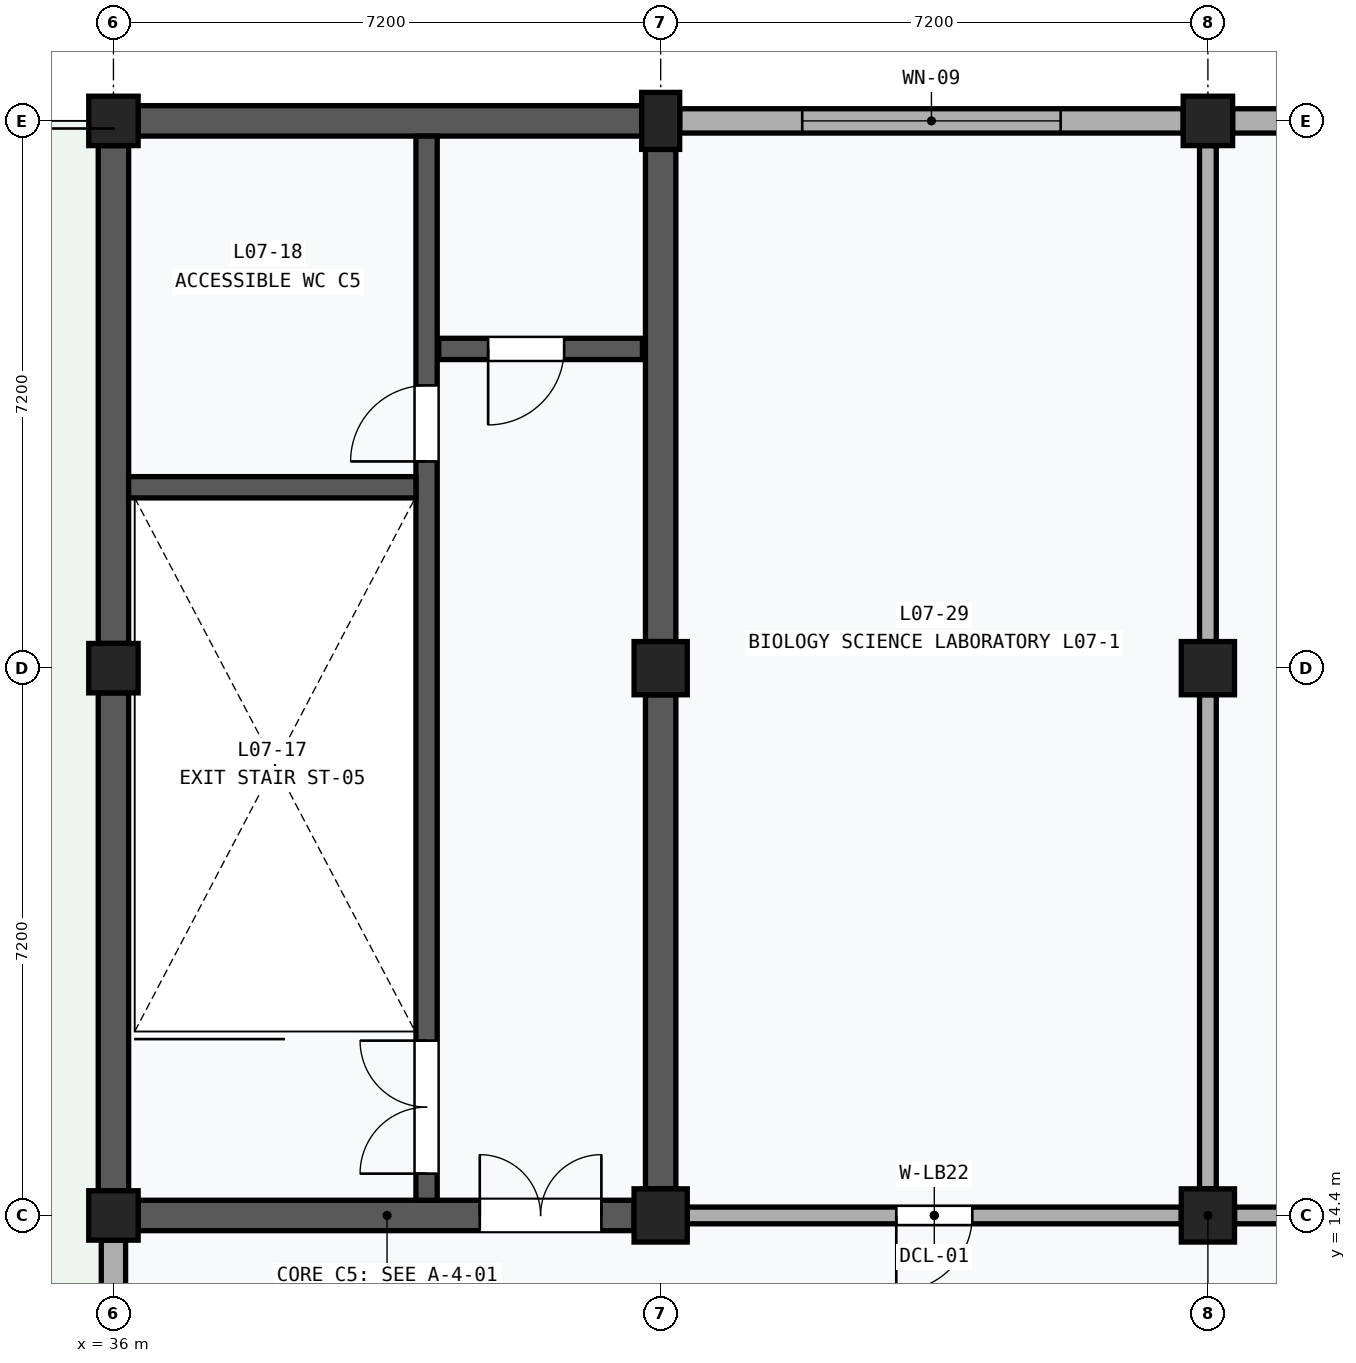
"""IFC4 building model, lengths in metres.
Left out: names, types, materials, properties, quantities, classifications, styles, units other than length and angle.
Written with IfcOpenShell. Run it as: python <this file> out.ifc"""

import sys

from ifc_helpers import new_model, si_unit, direction, frame, frame_2d, origin, origin_2d, place, context, subcontext, project, spatial, rectangle, extrude, element, fill, save


model = new_model("IFC4")
c1 = context("Model", 3, precision=1e-05, world=origin(), true_north=direction((0.0, 1.0)))
c2 = subcontext(c1, "Body", "Model", "MODEL_VIEW")
j1 = project(units=[si_unit("LENGTHUNIT", "METRE"), si_unit("PLANEANGLEUNIT", "RADIAN")], contexts=[c1])
p1 = place(None, origin())
s1 = spatial("IfcSite", under=j1, at=p1, CompositionType="ELEMENT")
p2 = place(p1, origin())
s2 = spatial("IfcBuilding", under=s1, at=p2, CompositionType="ELEMENT")
p3 = place(p2, frame((0.0, 0.0, 30.6)))
s3 = spatial("IfcBuildingStorey", under=s2, at=p3, CompositionType="ELEMENT", Elevation=30.6)
for number, where, z_axis, x_axis in (
    (1, (36.0, 14.4, 0.0), (0.0, 0.0, 1.0), (1.0, 0.0, 0.0)),
    (2, (36.0, 21.6, 0.0), (0.0, 0.0, 1.0), (1.0, 0.0, 0.0)),
    (3, (36.0, 28.8, 0.0), (0.0, 0.0, 1.0), (1.0, 0.0, 0.0)),
):
    element("IfcColumn", number, at=place(p3, frame(where, z_axis=z_axis, x_axis=x_axis)), inside=s3, PredefinedType="COLUMN", context=c2, shape_type="SweptSolid", body=[
        extrude(rectangle(XDim=0.65, YDim=0.65, at=origin_2d()), origin(), (0.0, 0.0, 1.0), 4.2),
    ])
for number, where, z_axis, x_axis in (
    (4, (43.2, 14.4, 0.0), (0.0, 0.0, 1.0), (1.0, 0.0, 0.0)),
    (5, (43.2, 21.6, 0.0), (0.0, 0.0, 1.0), (1.0, 0.0, 0.0)),
):
    element("IfcColumn", number, at=place(p3, frame(where, z_axis=z_axis, x_axis=x_axis)), inside=s3, PredefinedType="COLUMN", context=c2, shape_type="SweptSolid", body=[
        extrude(rectangle(XDim=0.7, YDim=0.7, at=origin_2d()), origin(), (0.0, 0.0, 1.0), 4.2),
    ])
p4 = place(p3, frame((43.2, 28.8, 0.0), z_axis=(0.0, 0.0, 1.0), x_axis=(1.0, 0.0, 0.0)))
e6 = element("IfcColumn", 6, at=p4, inside=s3, PredefinedType="PILASTER", context=c2, shape_type="SweptSolid", body=[
    extrude(rectangle(XDim=0.5, YDim=0.75, at=origin_2d()), origin(), (0.0, 0.0, 1.0), 4.2),
])
for number, where, z_axis, x_axis in (
    (7, (50.4, 14.4, 0.0), (0.0, 0.0, 1.0), (1.0, 0.0, 0.0)),
    (8, (50.4, 21.6, 0.0), (0.0, 0.0, 1.0), (1.0, 0.0, 0.0)),
):
    element("IfcColumn", number, at=place(p3, frame(where, z_axis=z_axis, x_axis=x_axis)), inside=s3, PredefinedType="COLUMN", context=c2, shape_type="SweptSolid", body=[
        extrude(rectangle(XDim=0.7, YDim=0.7, at=origin_2d()), origin(), (0.0, 0.0, 1.0), 4.2),
    ])
p5 = place(p3, frame((50.4, 28.8, 0.0), z_axis=(0.0, 0.0, 1.0), x_axis=(1.0, 0.0, 0.0)))
e9 = element("IfcColumn", 9, at=p5, inside=s3, PredefinedType="COLUMN", context=c2, shape_type="SweptSolid", body=[
    extrude(rectangle(XDim=0.65, YDim=0.65, at=origin_2d()), origin(), (0.0, 0.0, 1.0), 4.2),
])
p6 = place(p3, frame((36.0, 7.525, 0.0), z_axis=(0.0, 0.0, 1.0), x_axis=(0.0, 1.0, 0.0)))
e10 = element("IfcWall", 10, at=p6, inside=s3, PredefinedType="SOLIDWALL", context=c2, shape_type="SweptSolid", body=[
    extrude(rectangle(XDim=6.55, YDim=0.32, at=frame_2d((3.275, 0.0))), origin(), (0.0, 0.0, 1.0), 3.25),
])
p7 = place(p6, frame((2.525, 0.0, 0.0)))
e11 = element("IfcOpeningElement", 11, at=p7, cuts=e10, PredefinedType="OPENING", context=c2, shape_type="SweptSolid", body=[
    extrude(rectangle(XDim=1.5, YDim=2.15, at=frame_2d((0.75, 1.075))), frame((0.0, 0.172, 0.0), z_axis=(0.0, -1.0, 0.0), x_axis=(1.0, 0.0, 0.0)), (0.0, 0.0, 1.0), 0.344),
])
p8 = place(p3, frame((43.45, 28.8, 0.0), z_axis=(0.0, 0.0, 1.0), x_axis=(1.0, 0.0, 0.0)))
e12 = element("IfcWall", 12, at=p8, inside=s3, PredefinedType="SOLIDWALL", context=c2, shape_type="SweptSolid", body=[
    extrude(rectangle(XDim=6.625, YDim=0.32, at=frame_2d((3.312, 0.0))), origin(), (0.0, 0.0, 1.0), 3.25),
])
p9 = place(p8, frame((1.613, 0.0, 0.9)))
e13 = element("IfcOpeningElement", 13, at=p9, cuts=e12, PredefinedType="OPENING", context=c2, shape_type="SweptSolid", body=[
    extrude(rectangle(XDim=3.4, YDim=1.8, at=frame_2d((1.7, 0.9))), frame((0.0, 0.172, 0.0), z_axis=(0.0, -1.0, 0.0), x_axis=(1.0, 0.0, 0.0)), (0.0, 0.0, 1.0), 0.344),
])
p10 = place(p3, frame((50.725, 28.8, 0.0), z_axis=(0.0, 0.0, 1.0), x_axis=(1.0, 0.0, 0.0)))
e14 = element("IfcWall", 14, at=p10, inside=s3, PredefinedType="SOLIDWALL", context=c2, shape_type="SweptSolid", body=[
    extrude(rectangle(XDim=6.55, YDim=0.32, at=frame_2d((3.275, 0.0))), origin(), (0.0, 0.0, 1.0), 3.25),
])
p11 = place(p10, frame((2.375, 0.0, 0.85)))
e15 = element("IfcOpeningElement", 15, at=p11, cuts=e14, PredefinedType="OPENING", context=c2, shape_type="SweptSolid", body=[
    extrude(rectangle(XDim=1.8, YDim=2.0, at=frame_2d((0.9, 1.0))), frame((0.0, 0.172, 0.0), z_axis=(0.0, -1.0, 0.0), x_axis=(1.0, 0.0, 0.0)), (0.0, 0.0, 1.0), 0.344),
])
p12 = place(p3, frame((36.0, 14.725, 0.0), z_axis=(0.0, 0.0, 1.0), x_axis=(0.0, 1.0, 0.0)))
e16 = element("IfcWall", 16, at=p12, inside=s3, PredefinedType="SHEAR", context=c2, shape_type="SweptSolid", body=[
    extrude(rectangle(XDim=6.55, YDim=0.4, at=frame_2d((3.275, 0.0))), origin(), (0.0, 0.0, 1.0), 3.25),
])
p13 = place(p3, frame((36.0, 21.925, 0.0), z_axis=(0.0, 0.0, 1.0), x_axis=(0.0, 1.0, 0.0)))
e17 = element("IfcWall", 17, at=p13, inside=s3, PredefinedType="SHEAR", context=c2, shape_type="SweptSolid", body=[
    extrude(rectangle(XDim=6.55, YDim=0.4, at=frame_2d((3.275, 0.0))), origin(), (0.0, 0.0, 1.0), 3.25),
])
p14 = place(p3, frame((43.2, 14.75, 0.0), z_axis=(0.0, 0.0, 1.0), x_axis=(0.0, 1.0, 0.0)))
e18 = element("IfcWall", 18, at=p14, inside=s3, PredefinedType="SHEAR", context=c2, shape_type="SweptSolid", body=[
    extrude(rectangle(XDim=6.5, YDim=0.4, at=frame_2d((3.25, 0.0))), origin(), (0.0, 0.0, 1.0), 3.11),
])
p15 = place(p3, frame((43.2, 21.95, 0.0), z_axis=(0.0, 0.0, 1.0), x_axis=(0.0, 1.0, 0.0)))
e19 = element("IfcWall", 19, at=p15, inside=s3, PredefinedType="SHEAR", context=c2, shape_type="SweptSolid", body=[
    extrude(rectangle(XDim=6.475, YDim=0.4, at=frame_2d((3.238, 0.0))), origin(), (0.0, 0.0, 1.0), 3.11),
])
p16 = place(p3, frame((36.325, 14.4, 0.0), z_axis=(0.0, 0.0, 1.0), x_axis=(1.0, 0.0, 0.0)))
e20 = element("IfcWall", 20, at=p16, inside=s3, PredefinedType="SHEAR", context=c2, shape_type="SweptSolid", body=[
    extrude(rectangle(XDim=6.525, YDim=0.4, at=frame_2d((3.263, 0.0))), origin(), (0.0, 0.0, 1.0), 3.11),
])
p17 = place(p16, frame((4.495, 0.0, 0.0)))
e21 = element("IfcOpeningElement", 21, at=p17, cuts=e20, PredefinedType="OPENING", context=c2, shape_type="SweptSolid", body=[
    extrude(rectangle(XDim=1.6, YDim=2.2, at=frame_2d((0.8, 1.1))), frame((0.0, 0.212, 0.0), z_axis=(0.0, -1.0, 0.0), x_axis=(1.0, 0.0, 0.0)), (0.0, 0.0, 1.0), 0.424),
])
p18 = place(p3, frame((36.325, 28.8, 0.0), z_axis=(0.0, 0.0, 1.0), x_axis=(1.0, 0.0, 0.0)))
e22 = element("IfcWall", 22, at=p18, inside=s3, PredefinedType="SHEAR", context=c2, shape_type="SweptSolid", body=[
    extrude(rectangle(XDim=6.625, YDim=0.4, at=frame_2d((3.312, 0.0))), origin(), (0.0, 0.0, 1.0), 3.25),
])
p19 = place(p3, frame((40.12, 14.6, 0.0), z_axis=(0.0, 0.0, 1.0), x_axis=(0.0, 1.0, 0.0)))
e23 = element("IfcWall", 23, at=p19, inside=s3, PredefinedType="SHEAR", context=c2, shape_type="SweptSolid", body=[
    extrude(rectangle(XDim=14.0, YDim=0.28, at=frame_2d((7.0, 0.0))), origin(), (0.0, 0.0, 1.0), 3.88),
])
p20 = place(p19, frame((0.35, 0.0, 0.0)))
e24 = element("IfcOpeningElement", 24, at=p20, cuts=e23, PredefinedType="OPENING", context=c2, shape_type="SweptSolid", body=[
    extrude(rectangle(XDim=1.75, YDim=2.15, at=frame_2d((0.875, 1.075))), frame((0.0, 0.152, 0.0), z_axis=(0.0, -1.0, 0.0), x_axis=(1.0, 0.0, 0.0)), (0.0, 0.0, 1.0), 0.304),
])
p21 = place(p19, frame((9.72, 0.0, 0.0)))
e25 = element("IfcOpeningElement", 25, at=p21, cuts=e23, PredefinedType="OPENING", context=c2, shape_type="SweptSolid", body=[
    extrude(rectangle(XDim=1.0, YDim=2.15, at=frame_2d((0.5, 1.075))), frame((0.0, 0.152, 0.0), z_axis=(0.0, -1.0, 0.0), x_axis=(1.0, 0.0, 0.0)), (0.0, 0.0, 1.0), 0.304),
])
p22 = place(p3, frame((36.2, 23.98, 0.0), z_axis=(0.0, 0.0, 1.0), x_axis=(1.0, 0.0, 0.0)))
e26 = element("IfcWall", 26, at=p22, inside=s3, PredefinedType="SHEAR", context=c2, shape_type="SweptSolid", body=[
    extrude(rectangle(XDim=3.78, YDim=0.28, at=frame_2d((1.89, 0.0))), origin(), (0.0, 0.0, 1.0), 3.88),
])
p23 = place(p3, frame((40.28, 25.8, 0.0), z_axis=(0.0, 0.0, 1.0), x_axis=(1.0, 0.0, 0.0)))
e27 = element("IfcWall", 27, at=p23, inside=s3, PredefinedType="SHEAR", context=c2, shape_type="SweptSolid", body=[
    extrude(rectangle(XDim=2.68, YDim=0.28, at=frame_2d((1.34, 0.0))), origin(), (0.0, 0.0, 1.0), 3.88),
])
p24 = place(p23, frame((0.65, 0.0, 0.0)))
e28 = element("IfcOpeningElement", 28, at=p24, cuts=e27, PredefinedType="OPENING", context=c2, shape_type="SweptSolid", body=[
    extrude(rectangle(XDim=1.0, YDim=2.15, at=frame_2d((0.5, 1.075))), frame((0.0, 0.152, 0.0), z_axis=(0.0, -1.0, 0.0), x_axis=(1.0, 0.0, 0.0)), (0.0, 0.0, 1.0), 0.304),
])
p25 = place(p3, frame((43.55, 14.4, 0.0), z_axis=(0.0, 0.0, 1.0), x_axis=(1.0, 0.0, 0.0)))
e29 = element("IfcWall", 29, at=p25, inside=s3, PredefinedType="PARTITIONING", context=c2, shape_type="SweptSolid", body=[
    extrude(rectangle(XDim=6.5, YDim=0.22, at=frame_2d((3.25, 0.0))), origin(), (0.0, 0.0, 1.0), 3.18),
])
p26 = place(p25, frame((2.75, 0.0, 0.0)))
e30 = element("IfcOpeningElement", 30, at=p26, cuts=e29, PredefinedType="OPENING", context=c2, shape_type="SweptSolid", body=[
    extrude(rectangle(XDim=1.0, YDim=2.1, at=frame_2d((0.5, 1.05))), frame((0.0, 0.122, 0.0), z_axis=(0.0, -1.0, 0.0), x_axis=(1.0, 0.0, 0.0)), (0.0, 0.0, 1.0), 0.244),
])
p27 = place(p3, frame((50.4, 14.75, 0.0), z_axis=(0.0, 0.0, 1.0), x_axis=(0.0, 1.0, 0.0)))
e31 = element("IfcWall", 31, at=p27, inside=s3, PredefinedType="PARTITIONING", context=c2, shape_type="SweptSolid", body=[
    extrude(rectangle(XDim=6.5, YDim=0.22, at=frame_2d((3.25, 0.0))), origin(), (0.0, 0.0, 1.0), 3.11),
])
p28 = place(p3, frame((50.4, 21.95, 0.0), z_axis=(0.0, 0.0, 1.0), x_axis=(0.0, 1.0, 0.0)))
e32 = element("IfcWall", 32, at=p28, inside=s3, PredefinedType="PARTITIONING", context=c2, shape_type="SweptSolid", body=[
    extrude(rectangle(XDim=6.525, YDim=0.22, at=frame_2d((3.263, 0.0))), origin(), (0.0, 0.0, 1.0), 3.11),
])
p29 = place(p3, frame((50.75, 14.4, 0.0), z_axis=(0.0, 0.0, 1.0), x_axis=(1.0, 0.0, 0.0)))
e33 = element("IfcWall", 33, at=p29, inside=s3, PredefinedType="PARTITIONING", context=c2, shape_type="SweptSolid", body=[
    extrude(rectangle(XDim=6.5, YDim=0.22, at=frame_2d((3.25, 0.0))), origin(), (0.0, 0.0, 1.0), 3.11),
])
p30 = place(p29, frame((2.74, 0.0, 0.0)))
e34 = element("IfcOpeningElement", 34, at=p30, cuts=e33, PredefinedType="OPENING", context=c2, shape_type="SweptSolid", body=[
    extrude(rectangle(XDim=1.02, YDim=2.12, at=frame_2d((0.51, 1.06))), frame((0.0, 0.122, 0.0), z_axis=(0.0, -1.0, 0.0), x_axis=(1.0, 0.0, 0.0)), (0.0, 0.0, 1.0), 0.244),
])
p31 = place(p9, origin())
e35 = element("IfcWindow", 35, at=p31, inside=s3, PartitioningType="SINGLE_PANEL", PredefinedType="WINDOW", context=c2, shape_type="SweptSolid", body=[
    extrude(rectangle(XDim=3.4, YDim=1.8, at=frame_2d((1.7, 0.9))), frame((0.0, 0.03, 0.0), z_axis=(0.0, -1.0, 0.0), x_axis=(1.0, 0.0, 0.0)), (0.0, 0.0, 1.0), 0.06),
])
fill(e13, e35)
p32 = place(p17, origin())
e36 = element("IfcDoor", 36, at=p32, inside=s3, OperationType="DOUBLE_DOOR_SINGLE_SWING", PredefinedType="DOOR", context=c2, shape_type="SweptSolid", body=[
    extrude(rectangle(XDim=1.6, YDim=2.2, at=frame_2d((0.8, 1.1))), frame((0.0, 0.025, 0.0), z_axis=(0.0, -1.0, 0.0), x_axis=(1.0, 0.0, 0.0)), (0.0, 0.0, 1.0), 0.05),
])
fill(e21, e36)
p33 = place(p20, origin())
e37 = element("IfcDoor", 37, at=p33, inside=s3, OperationType="DOUBLE_DOOR_SINGLE_SWING", PredefinedType="DOOR", context=c2, shape_type="SweptSolid", body=[
    extrude(rectangle(XDim=1.75, YDim=2.15, at=frame_2d((0.875, 1.075))), frame((0.0, 0.025, 0.0), z_axis=(0.0, -1.0, 0.0), x_axis=(1.0, 0.0, 0.0)), (0.0, 0.0, 1.0), 0.05),
])
fill(e24, e37)
p34 = place(p21, origin())
e38 = element("IfcDoor", 38, at=p34, inside=s3, OperationType="SINGLE_SWING_LEFT", PredefinedType="DOOR", context=c2, shape_type="SweptSolid", body=[
    extrude(rectangle(XDim=1.0, YDim=2.15, at=frame_2d((0.5, 1.075))), frame((0.0, 0.025, 0.0), z_axis=(0.0, -1.0, 0.0), x_axis=(1.0, 0.0, 0.0)), (0.0, 0.0, 1.0), 0.05),
])
fill(e25, e38)
p35 = place(p24, frame((1.0, 0.0, 0.0), z_axis=(0.0, 0.0, 1.0), x_axis=(-1.0, 0.0, 0.0)))
e39 = element("IfcDoor", 39, at=p35, inside=s3, OperationType="SINGLE_SWING_RIGHT", PredefinedType="DOOR", context=c2, shape_type="SweptSolid", body=[
    extrude(rectangle(XDim=1.0, YDim=2.15, at=frame_2d((0.5, 1.075))), frame((0.0, 0.025, 0.0), z_axis=(0.0, -1.0, 0.0), x_axis=(1.0, 0.0, 0.0)), (0.0, 0.0, 1.0), 0.05),
])
fill(e28, e39)
p36 = place(p26, frame((1.0, 0.0, 0.0), z_axis=(0.0, 0.0, 1.0), x_axis=(-1.0, 0.0, 0.0)))
e40 = element("IfcDoor", 40, at=p36, inside=s3, OperationType="SINGLE_SWING_RIGHT", PredefinedType="DOOR", context=c2, shape_type="SweptSolid", body=[
    extrude(rectangle(XDim=1.0, YDim=2.1, at=frame_2d((0.5, 1.05))), frame((0.0, 0.025, 0.0), z_axis=(0.0, -1.0, 0.0), x_axis=(1.0, 0.0, 0.0)), (0.0, 0.0, 1.0), 0.05),
])
fill(e30, e40)
save(model, sys.argv[1])
